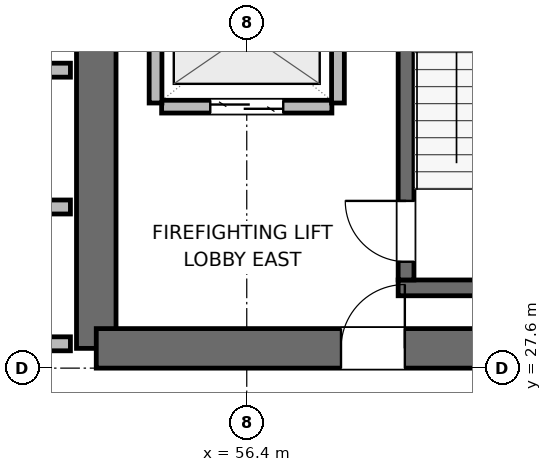
"""IFC4 building model, lengths in metres.
Left out: names, types, materials, properties, quantities, classifications, styles, units other than length and angle.
Written with IfcOpenShell. Run it as: python <this file> out.ifc"""

import sys

from ifc_helpers import new_model, si_unit, direction, frame, frame_2d, origin, place, context, subcontext, project, spatial, rectangle, extrude, element, fill, save


model = new_model("IFC4")
c1 = context("Model", 3, precision=1e-05, world=origin(), true_north=direction((0.0, 1.0)))
c2 = subcontext(c1, "Body", "Model", "MODEL_VIEW")
j1 = project(units=[si_unit("LENGTHUNIT", "METRE"), si_unit("PLANEANGLEUNIT", "RADIAN")], contexts=[c1])
p1 = place(None, origin())
s1 = spatial("IfcSite", under=j1, at=p1, CompositionType="ELEMENT")
p2 = place(p1, origin())
s2 = spatial("IfcBuilding", under=s1, at=p2, CompositionType="ELEMENT")
p3 = place(p2, frame((0.0, 0.0, 255.0)))
s3 = spatial("IfcBuildingStorey", under=s2, at=p3, CompositionType="ELEMENT", Elevation=255.0)
p4 = place(p3, frame((53.925, 27.925, 0.0), z_axis=(0.0, 0.0, 1.0), x_axis=(0.0, 1.0, 0.0)))
e1 = element("IfcWall", 1, at=p4, inside=s3, PredefinedType="SHEAR", context=c2, shape_type="SweptSolid", body=[
    extrude(rectangle(XDim=7.875, YDim=0.65, at=frame_2d((3.938, 0.0))), origin(), (0.0, 0.0, 1.0), 3.9),
])
p5 = place(p3, frame((53.925, 27.925, 0.0), z_axis=(0.0, 0.0, 1.0), x_axis=(1.0, 0.0, 0.0)))
e2 = element("IfcWall", 2, at=p5, inside=s3, PredefinedType="SHEAR", context=c2, shape_type="SweptSolid", body=[
    extrude(rectangle(XDim=9.35, YDim=0.65, at=frame_2d((4.675, 0.0))), origin(), (0.0, 0.0, 1.0), 3.9),
])
p6 = place(p5, frame((4.025, 0.0, 0.0)))
e3 = element("IfcOpeningElement", 3, at=p6, cuts=e2, PredefinedType="OPENING", context=c2, shape_type="SweptSolid", body=[
    extrude(rectangle(XDim=1.05, YDim=2.04, at=frame_2d((0.525, 1.02))), frame((0.0, 0.335, 0.0), z_axis=(0.0, -1.0, 0.0), x_axis=(1.0, 0.0, 0.0)), (0.0, 0.0, 1.0), 0.67),
])
p7 = place(p3, frame((58.89, 28.92, 0.0), z_axis=(0.0, 0.0, 1.0), x_axis=(1.0, 0.0, 0.0)))
e4 = element("IfcWall", 4, at=p7, inside=s3, PredefinedType="SHEAR", context=c2, shape_type="SweptSolid", body=[
    extrude(rectangle(XDim=4.06, YDim=0.26, at=frame_2d((2.03, 0.0))), origin(), (0.0, 0.0, 1.0), 3.9),
])
p8 = place(p3, frame((59.02, 29.05, 0.0), z_axis=(0.0, 0.0, 1.0), x_axis=(0.0, 1.0, 0.0)))
e5 = element("IfcWall", 5, at=p8, inside=s3, PredefinedType="SHEAR", context=c2, shape_type="SweptSolid", body=[
    extrude(rectangle(XDim=7.6, YDim=0.26, at=frame_2d((3.8, 0.0))), origin(), (0.0, 0.0, 1.0), 3.9),
])
p9 = place(p8, frame((0.3, 0.0, 0.0)))
e6 = element("IfcOpeningElement", 6, at=p9, cuts=e5, PredefinedType="OPENING", context=c2, shape_type="SweptSolid", body=[
    extrude(rectangle(XDim=1.0, YDim=2.04, at=frame_2d((0.5, 1.02))), frame((0.0, 0.14, 0.0), z_axis=(0.0, -1.0, 0.0), x_axis=(1.0, 0.0, 0.0)), (0.0, 0.0, 1.0), 0.28),
])
p10 = place(p3, frame((55.0, 31.9, 0.0), z_axis=(0.0, 0.0, 1.0), x_axis=(1.0, 0.0, 0.0)))
e7 = element("IfcWall", 7, at=p10, inside=s3, PredefinedType="PARTITIONING", context=c2, shape_type="SweptSolid", body=[
    extrude(rectangle(XDim=2.8, YDim=0.21, at=frame_2d((1.4, 0.0))), origin(), (0.0, 0.0, 1.0), 3.68),
])
p11 = place(p10, frame((0.8, 0.0, 0.0)))
e8 = element("IfcOpeningElement", 8, at=p11, cuts=e7, PredefinedType="OPENING", context=c2, shape_type="SweptSolid", body=[
    extrude(rectangle(XDim=1.2, YDim=2.04, at=frame_2d((0.6, 1.02))), frame((0.0, 0.115, 0.0), z_axis=(0.0, -1.0, 0.0), x_axis=(1.0, 0.0, 0.0)), (0.0, 0.0, 1.0), 0.23),
])
for number, where, z_axis, x_axis in (
    (9, (54.9, 31.96, 0.0), (0.0, 0.0, 1.0), (0.0, 1.0, 0.0)),
    (10, (57.9, 31.96, 0.0), (0.0, 0.0, 1.0), (0.0, 1.0, 0.0)),
):
    element("IfcWall", number, at=place(p3, frame(where, z_axis=z_axis, x_axis=x_axis)), inside=s3, PredefinedType="PARTITIONING", context=c2, shape_type="SweptSolid", body=[
        extrude(rectangle(XDim=2.28, YDim=0.21, at=frame_2d((1.14, 0.0))), origin(), (0.0, 0.0, 1.0), 3.68),
    ])
p12 = place(p3, frame((49.317, 28.0, 0.0), z_axis=(0.0, 0.0, 1.0), x_axis=(1.0, 0.0, 0.0)))
e11 = element("IfcWall", 11, at=p12, inside=s3, PredefinedType="PARTITIONING", context=c2, shape_type="SweptSolid", body=[
    extrude(rectangle(XDim=4.183, YDim=0.23, at=frame_2d((2.092, 0.0))), origin(), (0.0, 0.0, 1.0), 2.765),
])
p13 = place(p3, frame((52.2, 32.5, 0.0), z_axis=(0.0, 0.0, 1.0), x_axis=(1.0, 0.0, 0.0)))
e12 = element("IfcWall", 12, at=p13, inside=s3, PredefinedType="PARTITIONING", context=c2, shape_type="SweptSolid", body=[
    extrude(rectangle(XDim=1.3, YDim=0.23, at=frame_2d((0.65, 0.0))), origin(), (0.0, 0.0, 1.0), 3.68),
])
p14 = place(p3, frame((49.317, 30.25, 0.0), z_axis=(0.0, 0.0, 1.0), x_axis=(1.0, 0.0, 0.0)))
e13 = element("IfcWall", 13, at=p14, inside=s3, PredefinedType="PARTITIONING", context=c2, shape_type="SweptSolid", body=[
    extrude(rectangle(XDim=4.183, YDim=0.23, at=frame_2d((2.092, 0.0))), origin(), (0.0, 0.0, 1.0), 3.68),
])
p15 = place(p9, origin())
e14 = element("IfcDoor", 14, at=p15, inside=s3, OperationType="SINGLE_SWING_RIGHT", PredefinedType="DOOR", context=c2, shape_type="SweptSolid", body=[
    extrude(rectangle(XDim=1.0, YDim=2.04, at=frame_2d((0.5, 1.02))), frame((0.0, 0.025, 0.0), z_axis=(0.0, -1.0, 0.0), x_axis=(1.0, 0.0, 0.0)), (0.0, 0.0, 1.0), 0.05),
])
fill(e6, e14)
p16 = place(p11, origin())
e15 = element("IfcDoor", 15, at=p16, inside=s3, OperationType="DOUBLE_DOOR_SLIDING", PredefinedType="DOOR", context=c2, shape_type="SweptSolid", body=[
    extrude(rectangle(XDim=1.2, YDim=2.04, at=frame_2d((0.6, 1.02))), frame((0.0, 0.025, 0.0), z_axis=(0.0, -1.0, 0.0), x_axis=(1.0, 0.0, 0.0)), (0.0, 0.0, 1.0), 0.05),
])
fill(e8, e15)
p17 = place(p6, origin())
e16 = element("IfcDoor", 16, at=p17, inside=s3, OperationType="SINGLE_SWING_RIGHT", PredefinedType="DOOR", context=c2, shape_type="SweptSolid", body=[
    extrude(rectangle(XDim=1.05, YDim=2.04, at=frame_2d((0.525, 1.02))), frame((0.0, 0.025, 0.0), z_axis=(0.0, -1.0, 0.0), x_axis=(1.0, 0.0, 0.0)), (0.0, 0.0, 1.0), 0.05),
])
fill(e3, e16)
save(model, sys.argv[1])
